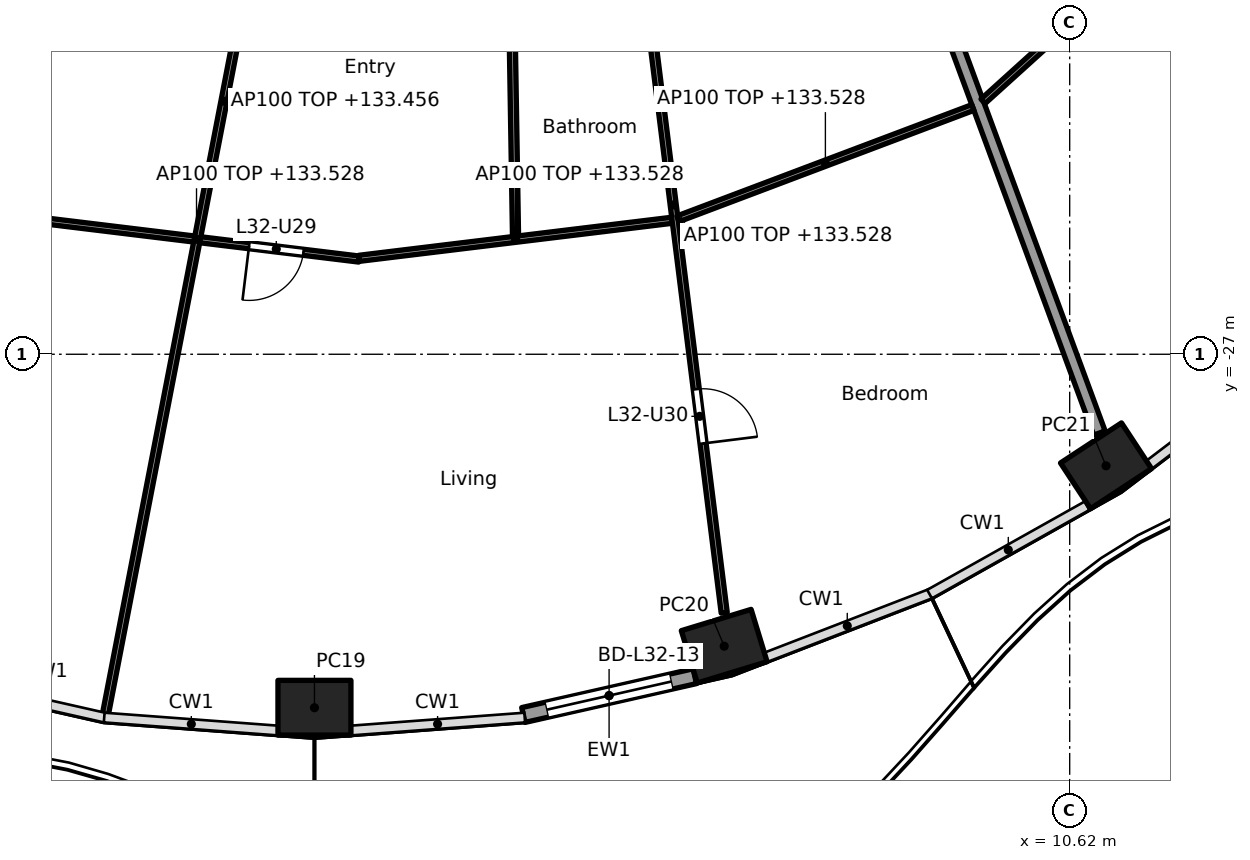
"""IFC4 building model, lengths in metres.
Left out: names, types, materials, properties, quantities, classifications, styles, units other than length and angle.
Written with IfcOpenShell. Run it as: python <this file> out.ifc"""

import sys

from ifc_helpers import new_model, si_unit, direction, frame, frame_2d, origin, origin_2d, place, context, subcontext, project, spatial, rectangle, hollow_rectangle, extrude, element, fill, save


model = new_model("IFC4")
c1 = context("Model", 3, precision=1e-05, world=origin(), true_north=direction((0.0, 1.0)))
c2 = subcontext(c1, "Body", "Model", "MODEL_VIEW")
j1 = project(units=[si_unit("LENGTHUNIT", "METRE"), si_unit("PLANEANGLEUNIT", "RADIAN")], contexts=[c1])
p1 = place(None, origin())
s1 = spatial("IfcSite", under=j1, at=p1, CompositionType="ELEMENT")
p2 = place(p1, origin())
s2 = spatial("IfcBuilding", under=s1, at=p2, CompositionType="ELEMENT")
p3 = place(p2, frame((0.0, 0.0, 130.7)))
s3 = spatial("IfcBuildingStorey", under=s2, at=p3, CompositionType="ELEMENT", Elevation=130.7)
for number, where, z_axis, x_axis in (
    (1, (-1.8, -32.813, 0.0), (0.0, 0.0, 1.0), (1.0, 0.0, 0.0)),
    (2, (4.938, -31.801, 0.0), (0.0, 0.0, 1.0), (0.957, 0.292, 0.0)),
    (3, (11.218, -28.834, 0.0), (0.0, 0.0, 1.0), (0.836, 0.549, 0.0)),
):
    element("IfcColumn", number, at=place(p3, frame(where, z_axis=z_axis, x_axis=x_axis)), inside=s3, PredefinedType="COLUMN", context=c2, shape_type="SweptSolid", body=[
        extrude(hollow_rectangle(XDim=1.2, YDim=0.9, WallThickness=0.04, at=origin_2d()), origin(), (0.0, 0.0, 1.0), 3.7),
    ])
p4 = place(p3, frame((4.455, -32.294, 0.0), z_axis=(0.0, 0.0, 1.0), x_axis=(-0.975339035722, -0.220711951186, 0.0)))
e4 = element("IfcWall", 4, at=p4, inside=s3, PredefinedType="SOLIDWALL", context=c2, shape_type="SweptSolid", body=[
    extrude(rectangle(XDim=2.89, YDim=0.25, at=frame_2d((1.445, 0.0))), origin(), (0.0, 0.0, 1.0), 3.44),
])
p5 = place(p4, frame((0.395, 0.0, 0.0)))
e5 = element("IfcOpeningElement", 5, at=p5, cuts=e4, PredefinedType="OPENING", context=c2, shape_type="SweptSolid", body=[
    extrude(rectangle(XDim=2.1, YDim=2.4, at=frame_2d((1.05, 1.2))), frame((0.0, 0.135, 0.0), z_axis=(0.0, -1.0, 0.0), x_axis=(1.0, 0.0, 0.0)), (0.0, 0.0, 1.0), 0.27),
])
p6 = place(p3, frame((-6.149, -14.825, 0.0), z_axis=(0.0, 0.0, 1.0), x_axis=(-0.525406383516, -0.85085141603, 0.0)))
e6 = element("IfcWall", 6, at=p6, inside=s3, PredefinedType="PARTITIONING", context=c2, shape_type="SweptSolid", body=[
    extrude(rectangle(XDim=15.925, YDim=0.2, at=frame_2d((7.962, 0.0))), origin(), (0.0, 0.0, 1.0), 2.828),
])
p7 = place(p3, frame((6.14, -14.829, 0.0), z_axis=(0.0, 0.0, 1.0), x_axis=(0.346169582481, -0.938171956608, 0.0)))
e7 = element("IfcWall", 7, at=p7, inside=s3, PredefinedType="PARTITIONING", context=c2, shape_type="SweptSolid", body=[
    extrude(rectangle(XDim=14.354, YDim=0.2, at=frame_2d((7.177, 0.0))), origin(), (0.0, 0.0, 1.0), 2.828),
])
p8 = place(p3, frame((-6.413, -24.784, 0.0), z_axis=(0.0, 0.0, 1.0), x_axis=(0.99268660964, -0.120719903255, 0.0)))
e8 = element("IfcWall", 8, at=p8, inside=s3, PredefinedType="PARTITIONING", context=c2, shape_type="SweptSolid", body=[
    extrude(rectangle(XDim=5.385, YDim=0.1, at=frame_2d((2.693, 0.0))), origin(), (0.0, 0.0, 1.0), 2.828),
])
p9 = place(p8, frame((3.564, 0.0, 0.0)))
e9 = element("IfcOpeningElement", 9, at=p9, cuts=e8, PredefinedType="OPENING", context=c2, shape_type="SweptSolid", body=[
    extrude(rectangle(XDim=0.9, YDim=2.1, at=frame_2d((0.45, 1.05))), frame((0.0, 0.06, 0.0), z_axis=(0.0, -1.0, 0.0), x_axis=(1.0, 0.0, 0.0)), (0.0, 0.0, 1.0), 0.12),
])
p10 = place(p3, frame((-1.32, -12.663, 0.0), z_axis=(0.0, 0.0, 1.0), x_axis=(-0.189865535907, -0.98181010296, 0.0)))
e10 = element("IfcWall", 10, at=p10, inside=s3, PredefinedType="PARTITIONING", context=c2, shape_type="SweptSolid", body=[
    extrude(rectangle(XDim=20.729, YDim=0.1, at=frame_2d((10.365, 0.0))), origin(), (0.0, 0.0, 1.0), 2.756),
])
p11 = place(p10, frame((2.283, 0.0, 0.0)))
e11 = element("IfcOpeningElement", 11, at=p11, cuts=e10, PredefinedType="OPENING", context=c2, shape_type="SweptSolid", body=[
    extrude(rectangle(XDim=0.9, YDim=2.1, at=frame_2d((0.45, 1.05))), frame((0.0, 0.06, 0.0), z_axis=(0.0, -1.0, 0.0), x_axis=(1.0, 0.0, 0.0)), (0.0, 0.0, 1.0), 0.12),
])
p12 = place(p10, frame((8.622, 0.0, 0.0)))
e12 = element("IfcOpeningElement", 12, at=p12, cuts=e10, PredefinedType="OPENING", context=c2, shape_type="SweptSolid", body=[
    extrude(rectangle(XDim=0.9, YDim=2.1, at=frame_2d((0.45, 1.05))), frame((0.0, 0.06, 0.0), z_axis=(0.0, -1.0, 0.0), x_axis=(1.0, 0.0, 0.0)), (0.0, 0.0, 1.0), 0.12),
])
p13 = place(p3, frame((-1.066, -25.422, 0.0), z_axis=(0.0, 0.0, 1.0), x_axis=(0.992692993044, 0.120667400577, 0.0)))
e13 = element("IfcWall", 13, at=p13, inside=s3, PredefinedType="PARTITIONING", context=c2, shape_type="SweptSolid", body=[
    extrude(rectangle(XDim=5.186, YDim=0.1, at=frame_2d((2.593, 0.0))), origin(), (0.0, 0.0, 1.0), 2.828),
])
p14 = place(p3, frame((1.303, -12.665, 0.0), z_axis=(0.0, 0.0, 1.0), x_axis=(0.016444820401, -0.999864774798, 0.0)))
e14 = element("IfcWall", 14, at=p14, inside=s3, PredefinedType="PARTITIONING", context=c2, shape_type="SweptSolid", body=[
    extrude(rectangle(XDim=12.396, YDim=0.1, at=frame_2d((6.198, 0.0))), origin(), (0.0, 0.0, 1.0), 2.756),
])
p15 = place(p14, frame((2.232, 0.0, 0.0)))
e15 = element("IfcOpeningElement", 15, at=p15, cuts=e14, PredefinedType="OPENING", context=c2, shape_type="SweptSolid", body=[
    extrude(rectangle(XDim=0.9, YDim=2.1, at=frame_2d((0.45, 1.05))), frame((0.0, 0.06, 0.0), z_axis=(0.0, -1.0, 0.0), x_axis=(1.0, 0.0, 0.0)), (0.0, 0.0, 1.0), 0.12),
])
p16 = place(p14, frame((8.43, 0.0, 0.0)))
e16 = element("IfcOpeningElement", 16, at=p16, cuts=e14, PredefinedType="OPENING", context=c2, shape_type="SweptSolid", body=[
    extrude(rectangle(XDim=0.9, YDim=2.1, at=frame_2d((0.45, 1.05))), frame((0.0, 0.06, 0.0), z_axis=(0.0, -1.0, 0.0), x_axis=(1.0, 0.0, 0.0)), (0.0, 0.0, 1.0), 0.12),
])
p17 = place(p3, frame((3.262, -17.839, 0.0), z_axis=(0.0, 0.0, 1.0), x_axis=(0.124074750982, -0.992272873845, 0.0)))
e17 = element("IfcWall", 17, at=p17, inside=s3, PredefinedType="PARTITIONING", context=c2, shape_type="SweptSolid", body=[
    extrude(rectangle(XDim=13.516, YDim=0.1, at=frame_2d((6.758, 0.0))), origin(), (0.0, 0.0, 1.0), 2.828),
])
p18 = place(p17, frame((9.811, 0.0, 0.0)))
e18 = element("IfcOpeningElement", 18, at=p18, cuts=e17, PredefinedType="OPENING", context=c2, shape_type="SweptSolid", body=[
    extrude(rectangle(XDim=0.9, YDim=2.1, at=frame_2d((0.45, 1.05))), frame((0.0, 0.06, 0.0), z_axis=(0.0, -1.0, 0.0), x_axis=(1.0, 0.0, 0.0)), (0.0, 0.0, 1.0), 0.12),
])
p19 = place(p3, frame((4.178, -24.773, 0.0), z_axis=(0.0, 0.0, 1.0), x_axis=(0.935583811437, 0.353104703702, 0.0)))
e19 = element("IfcWall", 19, at=p19, inside=s3, PredefinedType="PARTITIONING", context=c2, shape_type="SweptSolid", body=[
    extrude(rectangle(XDim=5.184, YDim=0.1, at=frame_2d((2.592, 0.0))), origin(), (0.0, 0.0, 1.0), 2.828),
])
p20 = place(p3, frame((9.195, -22.84, 0.0), z_axis=(0.0, 0.0, 1.0), x_axis=(0.741675855479, 0.670758470241, 0.0)))
e20 = element("IfcWall", 20, at=p20, inside=s3, PredefinedType="PARTITIONING", context=c2, shape_type="SweptSolid", body=[
    extrude(rectangle(XDim=5.656, YDim=0.1, at=frame_2d((2.828, 0.0))), origin(), (0.0, 0.0, 1.0), 2.828),
])
p21 = place(p5, origin())
e21 = element("IfcDoor", 21, at=p21, inside=s3, OperationType="SLIDING_TO_LEFT", PredefinedType="DOOR", context=c2, shape_type="SweptSolid", body=[
    extrude(rectangle(XDim=2.1, YDim=2.4, at=frame_2d((1.05, 1.2))), frame((0.0, 0.025, 0.0), z_axis=(0.0, -1.0, 0.0), x_axis=(1.0, 0.0, 0.0)), (0.0, 0.0, 1.0), 0.05),
])
fill(e5, e21)
p22 = place(p9, frame((0.9, 0.0, 0.0), x_axis=(-1.0, 0.0, 0.0)))
e22 = element("IfcDoor", 22, at=p22, inside=s3, OperationType="SINGLE_SWING_RIGHT", PredefinedType="DOOR", context=c2, shape_type="SweptSolid", body=[
    extrude(rectangle(XDim=0.9, YDim=2.1, at=frame_2d((0.45, 1.05))), frame((0.0, 0.025, 0.0), z_axis=(0.0, -1.0, 0.0), x_axis=(1.0, 0.0, 0.0)), (0.0, 0.0, 1.0), 0.05),
])
fill(e9, e22)
p23 = place(p18, origin())
e23 = element("IfcDoor", 23, at=p23, inside=s3, OperationType="SINGLE_SWING_RIGHT", PredefinedType="DOOR", context=c2, shape_type="SweptSolid", body=[
    extrude(rectangle(XDim=0.9, YDim=2.1, at=frame_2d((0.45, 1.05))), frame((0.0, 0.025, 0.0), z_axis=(0.0, -1.0, 0.0), x_axis=(1.0, 0.0, 0.0)), (0.0, 0.0, 1.0), 0.05),
])
fill(e18, e23)
save(model, sys.argv[1])
